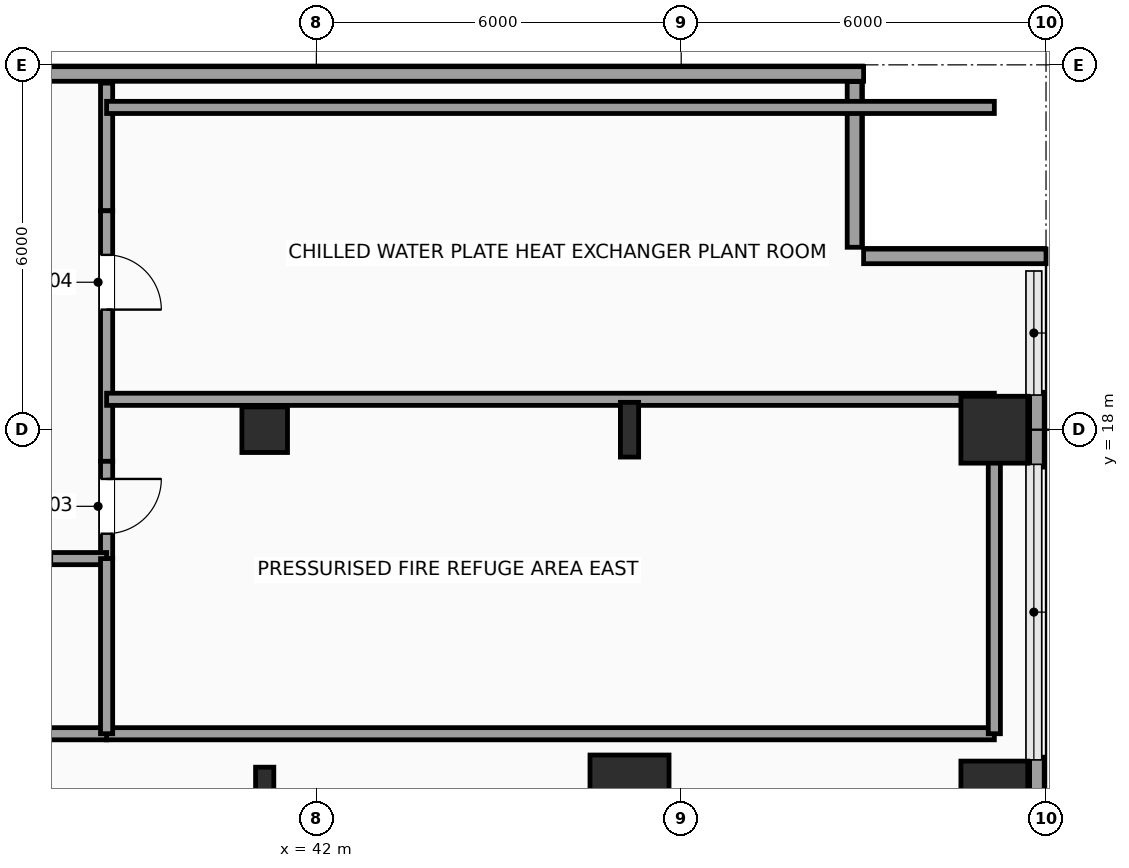
"""IFC4 building model, lengths in metres.
Left out: names, types, materials, properties, quantities, classifications, styles, units other than length and angle.
Written with IfcOpenShell. Run it as: python <this file> out.ifc"""

import sys

from ifc_helpers import new_model, si_unit, direction, frame, frame_2d, origin, origin_2d, place, context, subcontext, project, spatial, rectangle, hollow_rectangle, i_section, extrude, element, fill, save


model = new_model("IFC4")
c1 = context("Model", 3, precision=1e-05, world=origin(), true_north=direction((0.0, 1.0)))
c2 = subcontext(c1, "Body", "Model", "MODEL_VIEW")
j1 = project(units=[si_unit("LENGTHUNIT", "METRE"), si_unit("PLANEANGLEUNIT", "RADIAN")], contexts=[c1])
p1 = place(None, origin())
s1 = spatial("IfcSite", under=j1, at=p1, CompositionType="ELEMENT")
p2 = place(p1, origin())
s2 = spatial("IfcBuilding", under=s1, at=p2, CompositionType="ELEMENT")
p3 = place(p2, frame((0.0, 0.0, 94.8)))
s3 = spatial("IfcBuildingStorey", under=s2, at=p3, CompositionType="ELEMENT", Elevation=94.8)
p4 = place(p3, frame((41.15, 12.0, 0.0), z_axis=(0.0, 0.0, 1.0), x_axis=(1.0, 0.0, 0.0)))
e1 = element("IfcColumn", 1, at=p4, inside=s3, PredefinedType="COLUMN", context=c2, shape_type="SweptSolid", body=[
    extrude(i_section(OverallWidth=0.3, OverallDepth=0.9, WebThickness=0.019, FlangeThickness=0.035, FilletRadius=0.03, at=origin_2d()), origin(), (0.0, 0.0, 1.0), 4.8),
])
p5 = place(p3, frame((41.15, 18.0, 0.0), z_axis=(0.0, 0.0, 1.0), x_axis=(1.0, 0.0, 0.0)))
e2 = element("IfcColumn", 2, at=p5, inside=s3, PredefinedType="COLUMN", context=c2, shape_type="SweptSolid", body=[
    extrude(hollow_rectangle(XDim=0.75, YDim=0.75, WallThickness=0.035, InnerFilletRadius=0.035, OuterFilletRadius=0.05, at=origin_2d()), origin(), (0.0, 0.0, 1.0), 4.8),
])
p6 = place(p3, frame((47.15, 12.0, 0.0), z_axis=(0.0, 0.0, 1.0), x_axis=(1.0, 0.0, 0.0)))
e3 = element("IfcColumn", 3, at=p6, inside=s3, PredefinedType="COLUMN", context=c2, shape_type="SweptSolid", body=[
    extrude(rectangle(XDim=1.3, YDim=1.3, at=origin_2d()), origin(), (0.0, 0.0, 1.0), 4.8),
])
p7 = place(p3, frame((47.15, 18.0, 0.0), z_axis=(0.0, 0.0, 1.0), x_axis=(1.0, 0.0, 0.0)))
e4 = element("IfcColumn", 4, at=p7, inside=s3, PredefinedType="COLUMN", context=c2, shape_type="SweptSolid", body=[
    extrude(i_section(OverallWidth=0.3, OverallDepth=0.9, WebThickness=0.019, FlangeThickness=0.035, FilletRadius=0.03, at=origin_2d()), origin(), (0.0, 0.0, 1.0), 4.8),
])
for number, where, z_axis, x_axis in (
    (5, (53.15, 12.0, 0.0), (0.0, 0.0, 1.0), (1.0, 0.0, 0.0)),
    (6, (53.15, 18.0, 0.0), (0.0, 0.0, 1.0), (1.0, 0.0, 0.0)),
):
    element("IfcColumn", number, at=place(p3, frame(where, z_axis=z_axis, x_axis=x_axis)), inside=s3, PredefinedType="COLUMN", context=c2, shape_type="SweptSolid", body=[
        extrude(rectangle(XDim=1.1, YDim=1.1, at=origin_2d()), origin(), (0.0, 0.0, 1.0), 4.56),
    ])
p8 = place(p3, frame((24.0, 23.85, 0.0), z_axis=(0.0, 0.0, 1.0), x_axis=(1.0, 0.0, 0.0)))
e7 = element("IfcWall", 7, at=p8, inside=s3, PredefinedType="SOLIDWALL", context=c2, shape_type="SweptSolid", body=[
    extrude(rectangle(XDim=27.0, YDim=0.24, at=frame_2d((13.5, 0.0))), origin(), (0.0, 0.0, 1.0), 4.575),
])
p9 = place(p3, frame((50.85, 23.725, 0.0), z_axis=(0.0, 0.0, 1.0), x_axis=(0.0, -1.0, 0.0)))
e8 = element("IfcWall", 8, at=p9, inside=s3, PredefinedType="SOLIDWALL", context=c2, shape_type="SweptSolid", body=[
    extrude(rectangle(XDim=2.725, YDim=0.24, at=frame_2d((1.363, 0.0))), origin(), (0.0, 0.0, 1.0), 4.575),
])
p10 = place(p3, frame((51.0, 20.85, 0.0), z_axis=(0.0, 0.0, 1.0), x_axis=(1.0, 0.0, 0.0)))
e9 = element("IfcWall", 9, at=p10, inside=s3, PredefinedType="SOLIDWALL", context=c2, shape_type="SweptSolid", body=[
    extrude(rectangle(XDim=3.0, YDim=0.24, at=frame_2d((1.5, 0.0))), origin(), (0.0, 0.0, 1.0), 4.575),
])
for number, where, z_axis, x_axis in (
    (10, (53.85, 18.615, 0.0), (0.0, 0.0, 1.0), (0.0, -1.0, 0.0)),
    (11, (53.85, 12.615, 0.0), (0.0, 0.0, 1.0), (0.0, -1.0, 0.0)),
):
    element("IfcWall", number, at=place(p3, frame(where, z_axis=z_axis, x_axis=x_axis)), inside=s3, PredefinedType="SOLIDWALL", context=c2, shape_type="SweptSolid", body=[
        extrude(rectangle(XDim=1.23, YDim=0.24, at=frame_2d((0.615, 0.0))), origin(), (0.0, 0.0, 1.0), 4.575),
    ])
p11 = place(p3, frame((38.55, 23.7, 0.0), z_axis=(0.0, 0.0, 1.0), x_axis=(0.0, -1.0, 0.0)))
e12 = element("IfcWall", 12, at=p11, inside=s3, PredefinedType="SOLIDWALL", context=c2, shape_type="SweptSolid", body=[
    extrude(rectangle(XDim=2.1, YDim=0.2, at=frame_2d((1.05, 0.0))), origin(), (0.0, 0.0, 1.0), 4.575),
])
p12 = place(p3, frame((38.55, 21.6, 0.0), z_axis=(0.0, 0.0, 1.0), x_axis=(0.0, -1.0, 0.0)))
e13 = element("IfcWall", 13, at=p12, inside=s3, PredefinedType="SOLIDWALL", context=c2, shape_type="SweptSolid", body=[
    extrude(rectangle(XDim=4.12, YDim=0.2, at=frame_2d((2.06, 0.0))), origin(), (0.0, 0.0, 1.0), 4.575),
])
p13 = place(p12, frame((0.725, 0.0, 0.0)))
e14 = element("IfcOpeningElement", 14, at=p13, cuts=e13, PredefinedType="OPENING", context=c2, shape_type="SweptSolid", body=[
    extrude(rectangle(XDim=0.9, YDim=2.15, at=frame_2d((0.45, 1.075))), frame((0.0, 0.11, 0.0), z_axis=(0.0, -1.0, 0.0), x_axis=(1.0, 0.0, 0.0)), (0.0, 0.0, 1.0), 0.22),
])
p14 = place(p3, frame((38.55, 17.48, 0.0), z_axis=(0.0, 0.0, 1.0), x_axis=(0.0, -1.0, 0.0)))
e15 = element("IfcWall", 15, at=p14, inside=s3, PredefinedType="SOLIDWALL", context=c2, shape_type="SweptSolid", body=[
    extrude(rectangle(XDim=1.6, YDim=0.2, at=frame_2d((0.8, 0.0))), origin(), (0.0, 0.0, 1.0), 4.575),
])
p15 = place(p14, frame((0.29, 0.0, 0.0)))
e16 = element("IfcOpeningElement", 16, at=p15, cuts=e15, PredefinedType="OPENING", context=c2, shape_type="SweptSolid", body=[
    extrude(rectangle(XDim=0.9, YDim=2.15, at=frame_2d((0.45, 1.075))), frame((0.0, 0.11, 0.0), z_axis=(0.0, -1.0, 0.0), x_axis=(1.0, 0.0, 0.0)), (0.0, 0.0, 1.0), 0.22),
])
p16 = place(p3, frame((38.55, 15.88, 0.0), z_axis=(0.0, 0.0, 1.0), x_axis=(-1.0, 0.0, 0.0)))
e17 = element("IfcWall", 17, at=p16, inside=s3, PredefinedType="SOLIDWALL", context=c2, shape_type="SweptSolid", body=[
    extrude(rectangle(XDim=2.3, YDim=0.2, at=frame_2d((1.15, 0.0))), origin(), (0.0, 0.0, 1.0), 4.575),
])
p17 = place(p16, frame((0.9, 0.0, 0.0)))
e18 = element("IfcOpeningElement", 18, at=p17, cuts=e17, PredefinedType="OPENING", context=c2, shape_type="SweptSolid", body=[
    extrude(rectangle(XDim=0.9, YDim=2.15, at=frame_2d((0.45, 1.075))), frame((0.0, 0.11, 0.0), z_axis=(0.0, -1.0, 0.0), x_axis=(1.0, 0.0, 0.0)), (0.0, 0.0, 1.0), 0.22),
])
for number, where, z_axis, x_axis in (
    (19, (38.55, 13.0, 0.0), (0.0, 0.0, 1.0), (1.0, 0.0, 0.0)),
    (20, (38.55, 18.5, 0.0), (0.0, 0.0, 1.0), (1.0, 0.0, 0.0)),
):
    element("IfcWall", number, at=place(p3, frame(where, z_axis=z_axis, x_axis=x_axis)), inside=s3, PredefinedType="SOLIDWALL", context=c2, shape_type="SweptSolid", body=[
        extrude(rectangle(XDim=14.6, YDim=0.2, at=frame_2d((7.3, 0.0))), origin(), (0.0, 0.0, 1.0), 4.575),
    ])
p18 = place(p3, frame((53.15, 13.0, 0.0), z_axis=(0.0, 0.0, 1.0), x_axis=(0.0, 1.0, 0.0)))
e21 = element("IfcWall", 21, at=p18, inside=s3, PredefinedType="SOLIDWALL", context=c2, shape_type="SweptSolid", body=[
    extrude(rectangle(XDim=5.5, YDim=0.2, at=frame_2d((2.75, 0.0))), origin(), (0.0, 0.0, 1.0), 4.052),
])
p19 = place(p3, frame((38.55, 23.3, 0.0), z_axis=(0.0, 0.0, 1.0), x_axis=(1.0, 0.0, 0.0)))
e22 = element("IfcWall", 22, at=p19, inside=s3, PredefinedType="SOLIDWALL", context=c2, shape_type="SweptSolid", body=[
    extrude(rectangle(XDim=14.6, YDim=0.2, at=frame_2d((7.3, 0.0))), origin(), (0.0, 0.0, 1.0), 4.575),
])
p20 = place(p3, frame((33.65, 13.0, 0.0), z_axis=(0.0, 0.0, 1.0), x_axis=(1.0, 0.0, 0.0)))
e23 = element("IfcWall", 23, at=p20, inside=s3, PredefinedType="SOLIDWALL", context=c2, shape_type="SweptSolid", body=[
    extrude(rectangle(XDim=4.9, YDim=0.2, at=frame_2d((2.45, 0.0))), origin(), (0.0, 0.0, 1.0), 4.575),
])
p21 = place(p3, frame((38.55, 13.0, 0.0), z_axis=(0.0, 0.0, 1.0), x_axis=(0.0, 1.0, 0.0)))
e24 = element("IfcWall", 24, at=p21, inside=s3, PredefinedType="SOLIDWALL", context=c2, shape_type="SweptSolid", body=[
    extrude(rectangle(XDim=2.88, YDim=0.2, at=frame_2d((1.44, 0.0))), origin(), (0.0, 0.0, 1.0), 4.575),
])
p22 = place(p13, origin())
e25 = element("IfcDoor", 25, at=p22, inside=s3, OperationType="SINGLE_SWING_RIGHT", PredefinedType="DOOR", context=c2, shape_type="SweptSolid", body=[
    extrude(rectangle(XDim=0.9, YDim=2.15, at=frame_2d((0.45, 1.075))), frame((0.0, 0.025, 0.0), z_axis=(0.0, -1.0, 0.0), x_axis=(1.0, 0.0, 0.0)), (0.0, 0.0, 1.0), 0.05),
])
fill(e14, e25)
p23 = place(p15, origin())
e26 = element("IfcDoor", 26, at=p23, inside=s3, OperationType="SINGLE_SWING_LEFT", PredefinedType="DOOR", context=c2, shape_type="SweptSolid", body=[
    extrude(rectangle(XDim=0.9, YDim=2.15, at=frame_2d((0.45, 1.075))), frame((0.0, 0.025, 0.0), z_axis=(0.0, -1.0, 0.0), x_axis=(1.0, 0.0, 0.0)), (0.0, 0.0, 1.0), 0.05),
])
fill(e16, e26)
p24 = place(p17, origin())
e27 = element("IfcDoor", 27, at=p24, inside=s3, OperationType="SINGLE_SWING_RIGHT", PredefinedType="DOOR", context=c2, shape_type="SweptSolid", body=[
    extrude(rectangle(XDim=0.9, YDim=2.15, at=frame_2d((0.45, 1.075))), frame((0.0, 0.025, 0.0), z_axis=(0.0, -1.0, 0.0), x_axis=(1.0, 0.0, 0.0)), (0.0, 0.0, 1.0), 0.05),
])
fill(e18, e27)
save(model, sys.argv[1])
